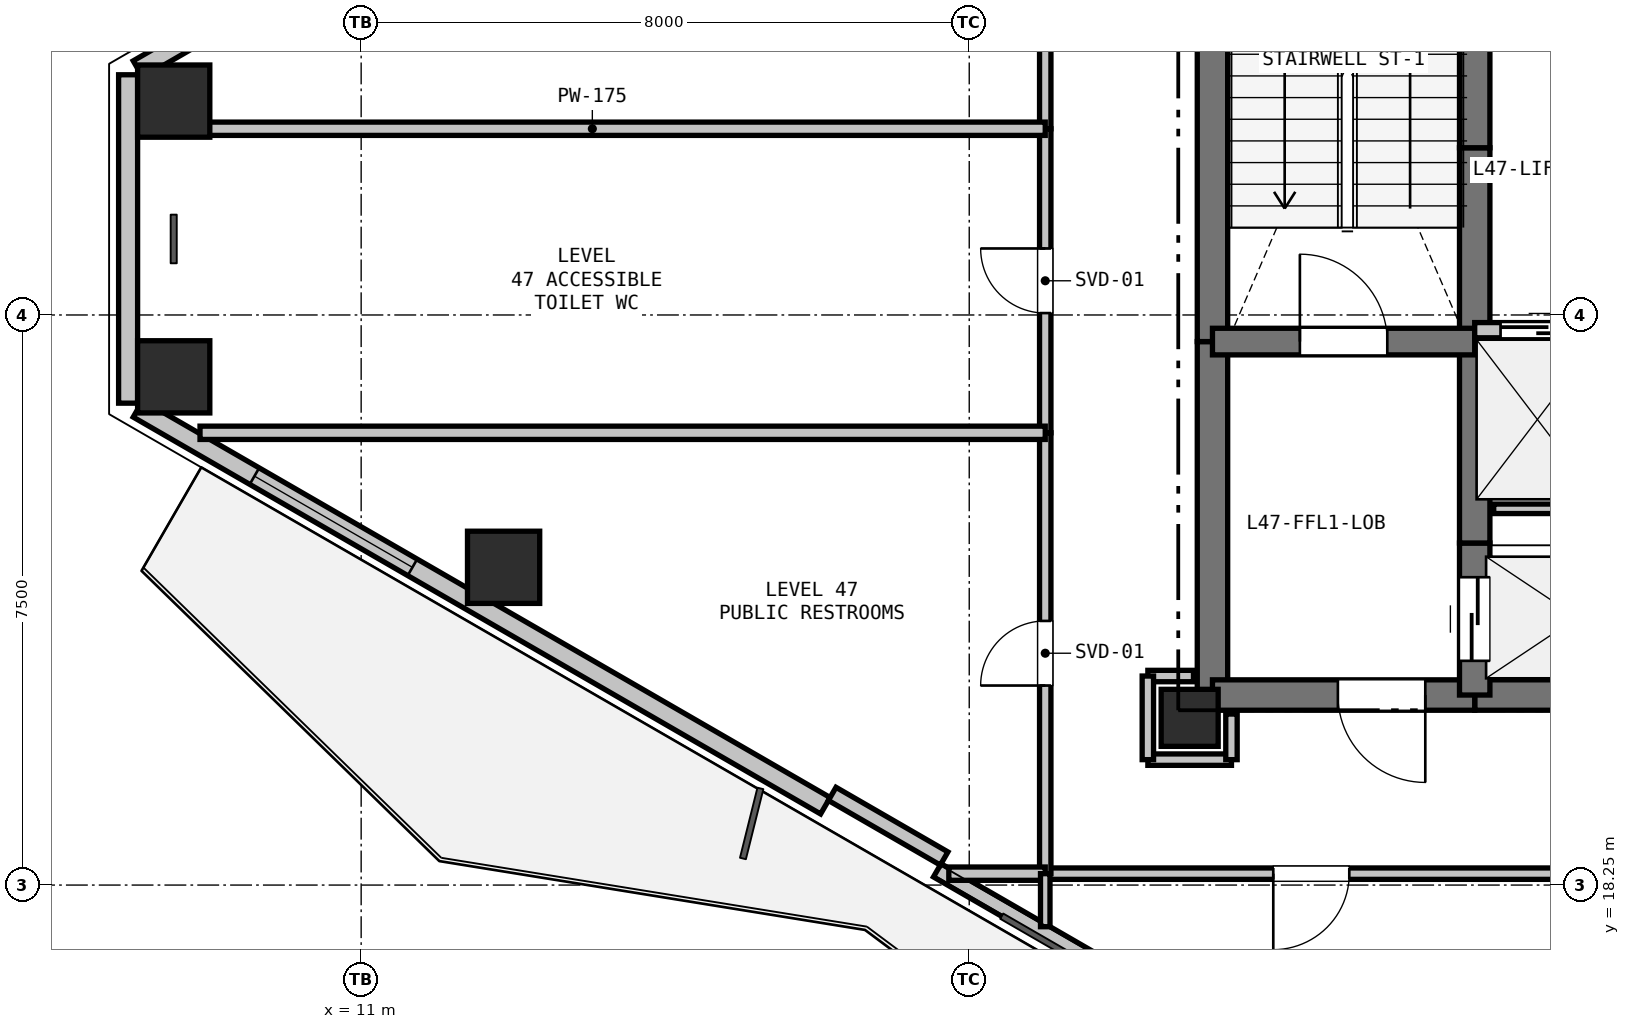
"""IFC4 building model, lengths in metres.
Left out: names, types, materials, properties, quantities, classifications, styles, units other than length and angle.
Written with IfcOpenShell. Run it as: python <this file> out.ifc"""

import sys

from ifc_helpers import new_model, si_unit, direction, frame, frame_2d, origin, origin_2d, place, context, subcontext, project, spatial, rectangle, hollow_rectangle, extrude, element, fill, save


model = new_model("IFC4")
c1 = context("Model", 3, precision=1e-05, world=origin(), true_north=direction((0.0, 1.0)))
c2 = subcontext(c1, "Body", "Model", "MODEL_VIEW")
j1 = project(units=[si_unit("LENGTHUNIT", "METRE"), si_unit("PLANEANGLEUNIT", "RADIAN")], contexts=[c1])
p1 = place(None, origin())
s1 = spatial("IfcSite", under=j1, at=p1, CompositionType="ELEMENT")
p2 = place(p1, origin())
s2 = spatial("IfcBuilding", under=s1, at=p2, CompositionType="ELEMENT")
p3 = place(p2, frame((0.0, 0.0, 170.7)))
s3 = spatial("IfcBuildingStorey", under=s2, at=p3, CompositionType="ELEMENT", Elevation=170.7)
p4 = place(p3, frame((21.9, 20.45, 0.0), z_axis=(0.0, 0.0, 1.0), x_axis=(1.0, 0.0, 0.0)))
e1 = element("IfcColumn", 1, at=p4, inside=s3, PredefinedType="COLUMN", context=c2, shape_type="SweptSolid", body=[
    extrude(rectangle(XDim=0.75, YDim=0.75, at=origin_2d()), origin(), (0.0, 0.0, 1.0), 4.8),
])
for number, where, z_axis, x_axis in (
    (2, (8.534, 28.564, 0.0), (0.0, 0.0, 1.0), (1.0, 0.0, 0.0)),
    (3, (12.874, 22.43, 0.0), (0.0, 0.0, 1.0), (1.0, 0.0, 0.0)),
    (4, (8.534, 24.936, 0.0), (0.0, 0.0, 1.0), (1.0, 0.0, 0.0)),
):
    element("IfcColumn", number, at=place(p3, frame(where, z_axis=z_axis, x_axis=x_axis)), inside=s3, PredefinedType="COLUMN", context=c2, shape_type="SweptSolid", body=[
        extrude(hollow_rectangle(XDim=0.95, YDim=0.95, WallThickness=0.028, at=origin_2d()), origin(), (0.0, 0.0, 1.0), 3.22),
    ])
p5 = place(p3, frame((7.934, 24.59, 0.0), z_axis=(0.0, 0.0, 1.0), x_axis=(0.0, 1.0, 0.0)))
e5 = element("IfcWall", 5, at=p5, inside=s3, PredefinedType="SOLIDWALL", context=c2, shape_type="SweptSolid", body=[
    extrude(rectangle(XDim=4.32, YDim=0.25, at=frame_2d((2.16, 0.0))), origin(), (0.0, 0.0, 1.0), 4.19),
])
p6 = place(p3, frame((8.064, 28.985, 0.0), z_axis=(0.0, 0.0, 1.0), x_axis=(0.866027516296, 0.499996341005, 0.0)))
e6 = element("IfcWall", 6, at=p6, inside=s3, PredefinedType="SOLIDWALL", context=c2, shape_type="SweptSolid", body=[
    extrude(rectangle(XDim=10.442, YDim=0.25, at=frame_2d((5.221, 0.0))), origin(), (0.0, 0.0, 1.0), 4.19),
])
p7 = place(p6, frame((7.514, 0.0, 0.0)))
e7 = element("IfcOpeningElement", 7, at=p7, cuts=e6, PredefinedType="OPENING", context=c2, shape_type="SweptSolid", body=[
    extrude(rectangle(XDim=1.0, YDim=2.1, at=frame_2d((0.5, 1.05))), frame((0.0, 0.135, 0.0), z_axis=(0.0, -1.0, 0.0), x_axis=(1.0, 0.0, 0.0)), (0.0, 0.0, 1.0), 0.27),
])
p8 = place(p3, frame((27.017, 13.573, 0.0), z_axis=(0.0, 0.0, 1.0), x_axis=(-0.866026169916, 0.499998673018, 0.0)))
e8 = element("IfcWall", 8, at=p8, inside=s3, PredefinedType="PARAPET", context=c2, shape_type="SweptSolid", body=[
    extrude(rectangle(XDim=9.742, YDim=0.2, at=frame_2d((4.871, 0.0))), origin(), (0.0, 0.0, 1.0), 0.2),
])
p9 = place(p3, frame((17.107, 19.294, 0.0), z_axis=(0.0, 0.0, 1.0), x_axis=(-0.866027516296, 0.499996341005, 0.0)))
e9 = element("IfcWall", 9, at=p9, inside=s3, PredefinedType="SOLIDWALL", context=c2, shape_type="SweptSolid", body=[
    extrude(rectangle(XDim=10.442, YDim=0.25, at=frame_2d((5.221, 0.0))), origin(), (0.0, 0.0, 1.0), 3.205),
])
p10 = place(p9, frame((6.273, 0.0, 0.9)))
e10 = element("IfcOpeningElement", 10, at=p10, cuts=e9, PredefinedType="OPENING", context=c2, shape_type="SweptSolid", body=[
    extrude(rectangle(XDim=2.4, YDim=2.2, at=frame_2d((1.2, 1.1))), frame((0.0, 0.135, 0.0), z_axis=(0.0, -1.0, 0.0), x_axis=(1.0, 0.0, 0.0)), (0.0, 0.0, 1.0), 0.27),
])
p11 = place(p3, frame((18.669, 18.6, 0.0), z_axis=(0.0, 0.0, 1.0), x_axis=(-0.86605165483, 0.499954529098, 0.0)))
e11 = element("IfcWall", 11, at=p11, inside=s3, PredefinedType="PARAPET", context=c2, shape_type="SweptSolid", body=[
    extrude(rectangle(XDim=1.7, YDim=0.2, at=frame_2d((0.85, 0.0))), origin(), (0.0, 0.0, 1.0), 4.19),
])
p12 = place(p3, frame((22.2, 20.75, 0.0), z_axis=(0.0, 0.0, 1.0), x_axis=(0.0, 1.0, 0.0)))
e12 = element("IfcWall", 12, at=p12, inside=s3, PredefinedType="SHEAR", context=c2, shape_type="SweptSolid", body=[
    extrude(rectangle(XDim=4.65, YDim=0.4, at=frame_2d((2.325, 0.0))), origin(), (0.0, 0.0, 1.0), 4.57),
])
p13 = place(p3, frame((22.2, 25.4, 0.0), z_axis=(0.0, 0.0, 1.0), x_axis=(0.0, 1.0, 0.0)))
e13 = element("IfcWall", 13, at=p13, inside=s3, PredefinedType="SHEAR", context=c2, shape_type="SweptSolid", body=[
    extrude(rectangle(XDim=7.35, YDim=0.4, at=frame_2d((3.675, 0.0))), origin(), (0.0, 0.0, 1.0), 4.57),
])
p14 = place(p3, frame((28.35, 20.75, 0.0), z_axis=(0.0, 0.0, 1.0), x_axis=(-1.0, 0.0, 0.0)))
e14 = element("IfcWall", 14, at=p14, inside=s3, PredefinedType="SHEAR", context=c2, shape_type="SweptSolid", body=[
    extrude(rectangle(XDim=2.7, YDim=0.4, at=frame_2d((1.35, 0.0))), origin(), (0.0, 0.0, 1.0), 4.57),
])
p15 = place(p3, frame((25.65, 20.75, 0.0), z_axis=(0.0, 0.0, 1.0), x_axis=(-1.0, 0.0, 0.0)))
e15 = element("IfcWall", 15, at=p15, inside=s3, PredefinedType="SHEAR", context=c2, shape_type="SweptSolid", body=[
    extrude(rectangle(XDim=3.45, YDim=0.4, at=frame_2d((1.725, 0.0))), origin(), (0.0, 0.0, 1.0), 4.57),
])
p16 = place(p15, frame((0.65, 0.0, 0.0)))
e16 = element("IfcOpeningElement", 16, at=p16, cuts=e15, PredefinedType="OPENING", context=c2, shape_type="SweptSolid", body=[
    extrude(rectangle(XDim=1.15, YDim=2.15, at=frame_2d((0.575, 1.075))), frame((0.0, 0.21, 0.0), z_axis=(0.0, -1.0, 0.0), x_axis=(1.0, 0.0, 0.0)), (0.0, 0.0, 1.0), 0.42),
])
p17 = place(p3, frame((25.65, 20.75, 0.0), z_axis=(0.0, 0.0, 1.0), x_axis=(0.0, 1.0, 0.0)))
e17 = element("IfcWall", 17, at=p17, inside=s3, PredefinedType="SHEAR", context=c2, shape_type="SweptSolid", body=[
    extrude(rectangle(XDim=2.0, YDim=0.4, at=frame_2d((1.0, 0.0))), origin(), (0.0, 0.0, 1.0), 4.57),
])
p18 = place(p17, frame((0.45, 0.0, 0.0)))
e18 = element("IfcOpeningElement", 18, at=p18, cuts=e17, PredefinedType="OPENING", context=c2, shape_type="SweptSolid", body=[
    extrude(rectangle(XDim=1.1, YDim=2.15, at=frame_2d((0.55, 1.075))), frame((0.0, 0.21, 0.0), z_axis=(0.0, -1.0, 0.0), x_axis=(1.0, 0.0, 0.0)), (0.0, 0.0, 1.0), 0.42),
])
p19 = place(p3, frame((25.65, 22.75, 0.0), z_axis=(0.0, 0.0, 1.0), x_axis=(0.0, 1.0, 0.0)))
e19 = element("IfcWall", 19, at=p19, inside=s3, PredefinedType="SHEAR", context=c2, shape_type="SweptSolid", body=[
    extrude(rectangle(XDim=2.8, YDim=0.4, at=frame_2d((1.4, 0.0))), origin(), (0.0, 0.0, 1.0), 4.57),
])
p20 = place(p3, frame((25.65, 25.55, 0.0), z_axis=(0.0, 0.0, 1.0), x_axis=(0.0, 1.0, 0.0)))
e20 = element("IfcWall", 20, at=p20, inside=s3, PredefinedType="SHEAR", context=c2, shape_type="SweptSolid", body=[
    extrude(rectangle(XDim=2.4, YDim=0.4, at=frame_2d((1.2, 0.0))), origin(), (0.0, 0.0, 1.0), 4.57),
])
p21 = place(p3, frame((25.65, 27.95, 0.0), z_axis=(0.0, 0.0, 1.0), x_axis=(0.0, 1.0, 0.0)))
e21 = element("IfcWall", 21, at=p21, inside=s3, PredefinedType="SHEAR", context=c2, shape_type="SweptSolid", body=[
    extrude(rectangle(XDim=4.8, YDim=0.4, at=frame_2d((2.4, 0.0))), origin(), (0.0, 0.0, 1.0), 4.57),
])
p22 = place(p3, frame((22.2, 25.4, 0.0), z_axis=(0.0, 0.0, 1.0), x_axis=(1.0, 0.0, 0.0)))
e22 = element("IfcWall", 22, at=p22, inside=s3, PredefinedType="SHEAR", context=c2, shape_type="SweptSolid", body=[
    extrude(rectangle(XDim=3.45, YDim=0.35, at=frame_2d((1.725, 0.0))), origin(), (0.0, 0.0, 1.0), 4.57),
])
p23 = place(p22, frame((1.15, 0.0, 0.0)))
e23 = element("IfcOpeningElement", 23, at=p23, cuts=e22, PredefinedType="OPENING", context=c2, shape_type="SweptSolid", body=[
    extrude(rectangle(XDim=1.15, YDim=2.15, at=frame_2d((0.575, 1.075))), frame((0.0, 0.185, 0.0), z_axis=(0.0, -1.0, 0.0), x_axis=(1.0, 0.0, 0.0)), (0.0, 0.0, 1.0), 0.37),
])
p24 = place(p3, frame((25.65, 25.55, 0.0), z_axis=(0.0, 0.0, 1.0), x_axis=(1.0, 0.0, 0.0)))
e24 = element("IfcWall", 24, at=p24, inside=s3, PredefinedType="PARTITIONING", context=c2, shape_type="SweptSolid", body=[
    extrude(rectangle(XDim=4.95, YDim=0.2, at=frame_2d((2.475, 0.0))), origin(), (0.0, 0.0, 1.0), 4.57),
])
p25 = place(p24, frame((0.34, 0.0, 0.0)))
e25 = element("IfcOpeningElement", 25, at=p25, cuts=e24, PredefinedType="OPENING", context=c2, shape_type="SweptSolid", body=[
    extrude(rectangle(XDim=1.1, YDim=2.15, at=frame_2d((0.55, 1.075))), frame((0.0, 0.11, 0.0), z_axis=(0.0, -1.0, 0.0), x_axis=(1.0, 0.0, 0.0)), (0.0, 0.0, 1.0), 0.22),
])
p26 = place(p24, frame((1.99, 0.0, 0.0)))
e26 = element("IfcOpeningElement", 26, at=p26, cuts=e24, PredefinedType="OPENING", context=c2, shape_type="SweptSolid", body=[
    extrude(rectangle(XDim=1.1, YDim=2.15, at=frame_2d((0.55, 1.075))), frame((0.0, 0.11, 0.0), z_axis=(0.0, -1.0, 0.0), x_axis=(1.0, 0.0, 0.0)), (0.0, 0.0, 1.0), 0.22),
])
p27 = place(p24, frame((3.64, 0.0, 0.0)))
e27 = element("IfcOpeningElement", 27, at=p27, cuts=e24, PredefinedType="OPENING", context=c2, shape_type="SweptSolid", body=[
    extrude(rectangle(XDim=1.1, YDim=2.15, at=frame_2d((0.55, 1.075))), frame((0.0, 0.11, 0.0), z_axis=(0.0, -1.0, 0.0), x_axis=(1.0, 0.0, 0.0)), (0.0, 0.0, 1.0), 0.22),
])
p28 = place(p3, frame((25.9, 23.2, 0.0), z_axis=(0.0, 0.0, 1.0), x_axis=(1.0, 0.0, 0.0)))
e28 = element("IfcWall", 28, at=p28, inside=s3, PredefinedType="PARTITIONING", context=c2, shape_type="SweptSolid", body=[
    extrude(rectangle(XDim=1.4, YDim=0.125, at=frame_2d((0.7, 0.0))), origin(), (0.0, 0.0, 1.0), 4.57),
])
p29 = place(p3, frame((21.35, 19.9, 0.0), z_axis=(0.0, 0.0, 1.0), x_axis=(1.0, 0.0, 0.0)))
e29 = element("IfcWall", 29, at=p29, inside=s3, PredefinedType="PARTITIONING", context=c2, shape_type="SweptSolid", body=[
    extrude(rectangle(XDim=1.1, YDim=0.15, at=frame_2d((0.55, 0.0))), origin(), (0.0, 0.0, 1.0), 4.57),
])
p30 = place(p3, frame((22.45, 19.9, 0.0), z_axis=(0.0, 0.0, 1.0), x_axis=(0.0, 1.0, 0.0)))
e30 = element("IfcWall", 30, at=p30, inside=s3, PredefinedType="PARTITIONING", context=c2, shape_type="SweptSolid", body=[
    extrude(rectangle(XDim=0.6, YDim=0.15, at=frame_2d((0.3, 0.0))), origin(), (0.0, 0.0, 1.0), 4.095),
])
p31 = place(p3, frame((27.0, 18.4, 0.0), z_axis=(0.0, 0.0, 1.0), x_axis=(-1.0, 0.0, 0.0)))
e31 = element("IfcWall", 31, at=p31, inside=s3, PredefinedType="PARTITIONING", context=c2, shape_type="SweptSolid", body=[
    extrude(rectangle(XDim=7.0, YDim=0.15, at=frame_2d((3.5, 0.0))), origin(), (0.0, 0.0, 1.0), 2.365),
])
p32 = place(p31, frame((3.0, 0.0, 0.0)))
e32 = element("IfcOpeningElement", 32, at=p32, cuts=e31, PredefinedType="OPENING", context=c2, shape_type="SweptSolid", body=[
    extrude(rectangle(XDim=1.0, YDim=2.15, at=frame_2d((0.5, 1.075))), frame((0.0, 0.085, 0.0), z_axis=(0.0, -1.0, 0.0), x_axis=(1.0, 0.0, 0.0)), (0.0, 0.0, 1.0), 0.17),
])
p33 = place(p3, frame((20.0, 18.4, 0.0), z_axis=(0.0, 0.0, 1.0), x_axis=(0.0, 1.0, 0.0)))
e33 = element("IfcWall", 33, at=p33, inside=s3, PredefinedType="PARTITIONING", context=c2, shape_type="SweptSolid", body=[
    extrude(rectangle(XDim=5.8, YDim=0.15, at=frame_2d((2.9, 0.0))), origin(), (0.0, 0.0, 1.0), 2.365),
])
p34 = place(p33, frame((2.475, 0.0, 0.0)))
e34 = element("IfcOpeningElement", 34, at=p34, cuts=e33, PredefinedType="OPENING", context=c2, shape_type="SweptSolid", body=[
    extrude(rectangle(XDim=0.85, YDim=2.1, at=frame_2d((0.425, 1.05))), frame((0.0, 0.085, 0.0), z_axis=(0.0, -1.0, 0.0), x_axis=(1.0, 0.0, 0.0)), (0.0, 0.0, 1.0), 0.17),
])
p35 = place(p3, frame((20.0, 24.2, 0.0), z_axis=(0.0, 0.0, 1.0), x_axis=(0.0, 1.0, 0.0)))
e35 = element("IfcWall", 35, at=p35, inside=s3, PredefinedType="PARTITIONING", context=c2, shape_type="SweptSolid", body=[
    extrude(rectangle(XDim=4.0, YDim=0.15, at=frame_2d((2.0, 0.0))), origin(), (0.0, 0.0, 1.0), 3.205),
])
p36 = place(p35, frame((1.575, 0.0, 0.0)))
e36 = element("IfcOpeningElement", 36, at=p36, cuts=e35, PredefinedType="OPENING", context=c2, shape_type="SweptSolid", body=[
    extrude(rectangle(XDim=0.85, YDim=2.1, at=frame_2d((0.425, 1.05))), frame((0.0, 0.085, 0.0), z_axis=(0.0, -1.0, 0.0), x_axis=(1.0, 0.0, 0.0)), (0.0, 0.0, 1.0), 0.17),
])
p37 = place(p3, frame((20.0, 28.2, 0.0), z_axis=(0.0, 0.0, 1.0), x_axis=(0.0, 1.0, 0.0)))
e37 = element("IfcWall", 37, at=p37, inside=s3, PredefinedType="PARTITIONING", context=c2, shape_type="SweptSolid", body=[
    extrude(rectangle(XDim=6.9, YDim=0.15, at=frame_2d((3.45, 0.0))), origin(), (0.0, 0.0, 1.0), 2.365),
])
p38 = place(p37, frame((2.95, 0.0, 0.0)))
e38 = element("IfcOpeningElement", 38, at=p38, cuts=e37, PredefinedType="OPENING", context=c2, shape_type="SweptSolid", body=[
    extrude(rectangle(XDim=1.0, YDim=2.15, at=frame_2d((0.5, 1.075))), frame((0.0, 0.085, 0.0), z_axis=(0.0, -1.0, 0.0), x_axis=(1.0, 0.0, 0.0)), (0.0, 0.0, 1.0), 0.17),
])
p39 = place(p3, frame((21.95, 21.0, 0.0), z_axis=(0.0, 0.0, 1.0), x_axis=(-1.0, 0.0, 0.0)))
e39 = element("IfcWall", 39, at=p39, inside=s3, PredefinedType="PARTITIONING", context=c2, shape_type="SweptSolid", body=[
    extrude(rectangle(XDim=0.6, YDim=0.15, at=frame_2d((0.3, 0.0))), origin(), (0.0, 0.0, 1.0), 4.095),
])
p40 = place(p3, frame((21.35, 21.0, 0.0), z_axis=(0.0, 0.0, 1.0), x_axis=(0.0, -1.0, 0.0)))
e40 = element("IfcWall", 40, at=p40, inside=s3, PredefinedType="PARTITIONING", context=c2, shape_type="SweptSolid", body=[
    extrude(rectangle(XDim=1.1, YDim=0.15, at=frame_2d((0.55, 0.0))), origin(), (0.0, 0.0, 1.0), 4.57),
])
p41 = place(p3, frame((20.0, 18.4, 0.0), z_axis=(0.0, 0.0, 1.0), x_axis=(-1.0, 0.0, 0.0)))
e41 = element("IfcWall", 41, at=p41, inside=s3, PredefinedType="PLUMBINGWALL", context=c2, shape_type="SweptSolid", body=[
    extrude(rectangle(XDim=1.269, YDim=0.175, at=frame_2d((0.634, 0.0))), origin(), (0.0, 0.0, 1.0), 2.365),
])
p42 = place(p3, frame((8.88, 24.2, 0.0), z_axis=(0.0, 0.0, 1.0), x_axis=(1.0, 0.0, 0.0)))
e42 = element("IfcWall", 42, at=p42, inside=s3, PredefinedType="PLUMBINGWALL", context=c2, shape_type="SweptSolid", body=[
    extrude(rectangle(XDim=11.12, YDim=0.175, at=frame_2d((5.56, 0.0))), origin(), (0.0, 0.0, 1.0), 3.205),
])
p43 = place(p3, frame((8.083, 28.2, 0.0), z_axis=(0.0, 0.0, 1.0), x_axis=(1.0, 0.0, 0.0)))
e43 = element("IfcWall", 43, at=p43, inside=s3, PredefinedType="PLUMBINGWALL", context=c2, shape_type="SweptSolid", body=[
    extrude(rectangle(XDim=11.917, YDim=0.175, at=frame_2d((5.958, 0.0))), origin(), (0.0, 0.0, 1.0), 3.205),
])
p44 = place(p3, frame((20.0, 17.702, 0.0), z_axis=(0.0, 0.0, 1.0), x_axis=(0.0, 1.0, 0.0)))
e44 = element("IfcWall", 44, at=p44, inside=s3, PredefinedType="PARTITIONING", context=c2, shape_type="SweptSolid", body=[
    extrude(rectangle(XDim=0.698, YDim=0.125, at=frame_2d((0.349, 0.0))), origin(), (0.0, 0.0, 1.0), 2.365),
])
p45 = place(p10, origin())
e45 = element("IfcWindow", 45, at=p45, inside=s3, PartitioningType="SINGLE_PANEL", PredefinedType="WINDOW", context=c2, shape_type="SweptSolid", body=[
    extrude(rectangle(XDim=2.4, YDim=2.2, at=frame_2d((1.2, 1.1))), frame((0.0, 0.03, 0.0), z_axis=(0.0, -1.0, 0.0), x_axis=(1.0, 0.0, 0.0)), (0.0, 0.0, 1.0), 0.06),
])
fill(e10, e45)
p46 = place(p25, origin())
e46 = element("IfcDoor", 46, at=p46, inside=s3, OperationType="SLIDING_TO_LEFT", PredefinedType="DOOR", context=c2, shape_type="SweptSolid", body=[
    extrude(rectangle(XDim=1.1, YDim=2.15, at=frame_2d((0.55, 1.075))), frame((0.0, 0.025, 0.0), z_axis=(0.0, -1.0, 0.0), x_axis=(1.0, 0.0, 0.0)), (0.0, 0.0, 1.0), 0.05),
])
fill(e25, e46)
p47 = place(p18, origin())
e47 = element("IfcDoor", 47, at=p47, inside=s3, OperationType="SLIDING_TO_LEFT", PredefinedType="DOOR", context=c2, shape_type="SweptSolid", body=[
    extrude(rectangle(XDim=1.1, YDim=2.15, at=frame_2d((0.55, 1.075))), frame((0.0, 0.025, 0.0), z_axis=(0.0, -1.0, 0.0), x_axis=(1.0, 0.0, 0.0)), (0.0, 0.0, 1.0), 0.05),
])
fill(e18, e47)
p48 = place(p23, origin())
e48 = element("IfcDoor", 48, at=p48, inside=s3, OperationType="SINGLE_SWING_LEFT", PredefinedType="DOOR", context=c2, shape_type="SweptSolid", body=[
    extrude(rectangle(XDim=1.15, YDim=2.15, at=frame_2d((0.575, 1.075))), frame((0.0, 0.025, 0.0), z_axis=(0.0, -1.0, 0.0), x_axis=(1.0, 0.0, 0.0)), (0.0, 0.0, 1.0), 0.05),
])
fill(e23, e48)
p49 = place(p16, origin())
e49 = element("IfcDoor", 49, at=p49, inside=s3, OperationType="SINGLE_SWING_LEFT", PredefinedType="DOOR", context=c2, shape_type="SweptSolid", body=[
    extrude(rectangle(XDim=1.15, YDim=2.15, at=frame_2d((0.575, 1.075))), frame((0.0, 0.025, 0.0), z_axis=(0.0, -1.0, 0.0), x_axis=(1.0, 0.0, 0.0)), (0.0, 0.0, 1.0), 0.05),
])
fill(e16, e49)
p50 = place(p34, origin())
e50 = element("IfcDoor", 50, at=p50, inside=s3, OperationType="SINGLE_SWING_LEFT", PredefinedType="DOOR", context=c2, shape_type="SweptSolid", body=[
    extrude(rectangle(XDim=0.85, YDim=2.1, at=frame_2d((0.425, 1.05))), frame((0.0, 0.025, 0.0), z_axis=(0.0, -1.0, 0.0), x_axis=(1.0, 0.0, 0.0)), (0.0, 0.0, 1.0), 0.05),
])
fill(e34, e50)
p51 = place(p36, origin())
e51 = element("IfcDoor", 51, at=p51, inside=s3, OperationType="SINGLE_SWING_RIGHT", PredefinedType="DOOR", context=c2, shape_type="SweptSolid", body=[
    extrude(rectangle(XDim=0.85, YDim=2.1, at=frame_2d((0.425, 1.05))), frame((0.0, 0.025, 0.0), z_axis=(0.0, -1.0, 0.0), x_axis=(1.0, 0.0, 0.0)), (0.0, 0.0, 1.0), 0.05),
])
fill(e36, e51)
p52 = place(p32, origin())
e52 = element("IfcDoor", 52, at=p52, inside=s3, OperationType="SINGLE_SWING_RIGHT", PredefinedType="DOOR", context=c2, shape_type="SweptSolid", body=[
    extrude(rectangle(XDim=1.0, YDim=2.15, at=frame_2d((0.5, 1.075))), frame((0.0, 0.025, 0.0), z_axis=(0.0, -1.0, 0.0), x_axis=(1.0, 0.0, 0.0)), (0.0, 0.0, 1.0), 0.05),
])
fill(e32, e52)
save(model, sys.argv[1])
